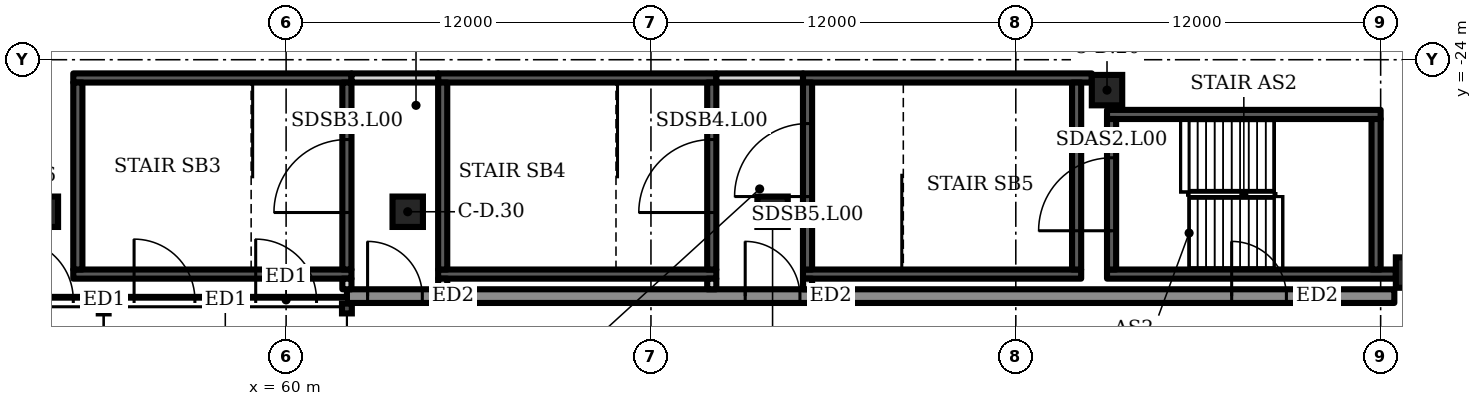
"""IFC4 building model, lengths in metres.
Left out: names, types, materials, properties, quantities, classifications, styles, units other than length and angle.
Written with IfcOpenShell. Run it as: python <this file> out.ifc"""

import sys

from ifc_helpers import new_model, si_unit, direction, frame, frame_2d, origin, origin_2d, place, context, subcontext, project, spatial, rectangle, hollow_circle, extrude, element, fill, save


model = new_model("IFC4")
c1 = context("Model", 3, precision=1e-05, world=origin(), true_north=direction((0.0, 1.0)))
c2 = subcontext(c1, "Body", "Model", "MODEL_VIEW")
j1 = project(units=[si_unit("LENGTHUNIT", "METRE"), si_unit("PLANEANGLEUNIT", "RADIAN")], contexts=[c1])
p1 = place(None, origin())
s1 = spatial("IfcSite", under=j1, at=p1, CompositionType="ELEMENT")
p2 = place(p1, origin())
s2 = spatial("IfcBuilding", under=s1, at=p2, CompositionType="ELEMENT")
p3 = place(p2, origin())
s3 = spatial("IfcBuildingStorey", under=s2, at=p3, CompositionType="ELEMENT", Elevation=0.0)
for number, where, z_axis, x_axis in (
    (1, (97.0, -31.0, 0.0), (0.0, 0.0, 1.0), (1.0, 0.0, 0.0)),
    (2, (87.0, -25.0, 0.0), (0.0, 0.0, 1.0), (1.0, 0.0, 0.0)),
    (3, (52.0, -29.0, 0.0), (0.0, 0.0, 1.0), (1.0, 0.0, 0.0)),
    (4, (64.0, -29.0, 0.0), (0.0, 0.0, 1.0), (1.0, 0.0, 0.0)),
    (5, (76.0, -29.0, 0.0), (0.0, 0.0, 1.0), (1.0, 0.0, 0.0)),
):
    element("IfcColumn", number, at=place(p3, frame(where, z_axis=z_axis, x_axis=x_axis)), inside=s3, PredefinedType="COLUMN", context=c2, shape_type="SweptSolid", body=[
        extrude(rectangle(XDim=1.0, YDim=1.0, at=origin_2d()), origin(), (0.0, 0.0, 1.0), 8.0),
    ])
p4 = place(p3, frame((62.0, -31.775, 0.0), z_axis=(0.0, 0.0, 1.0), x_axis=(1.0, 0.0, 0.0)))
e6 = element("IfcWall", 6, at=p4, inside=s3, PredefinedType="SOLIDWALL", context=c2, shape_type="SweptSolid", body=[
    extrude(rectangle(XDim=34.45, YDim=0.45, at=frame_2d((17.225, 0.0))), origin(), (0.0, 0.0, 1.0), 7.7),
])
p5 = place(p4, frame((13.1, 0.0, 0.0)))
e7 = element("IfcOpeningElement", 7, at=p5, cuts=e6, PredefinedType="OPENING", context=c2, shape_type="SweptSolid", body=[
    extrude(rectangle(XDim=1.8, YDim=2.4, at=frame_2d((0.9, 1.2))), frame((0.0, 0.235, 0.0), z_axis=(0.0, -1.0, 0.0), x_axis=(1.0, 0.0, 0.0)), (0.0, 0.0, 1.0), 0.47),
])
p6 = place(p4, frame((29.1, 0.0, 0.0)))
e8 = element("IfcOpeningElement", 8, at=p6, cuts=e6, PredefinedType="OPENING", context=c2, shape_type="SweptSolid", body=[
    extrude(rectangle(XDim=1.8, YDim=2.4, at=frame_2d((0.9, 1.2))), frame((0.0, 0.235, 0.0), z_axis=(0.0, -1.0, 0.0), x_axis=(1.0, 0.0, 0.0)), (0.0, 0.0, 1.0), 0.47),
])
p7 = place(p4, frame((0.68, 0.0, 0.0)))
e9 = element("IfcOpeningElement", 9, at=p7, cuts=e6, PredefinedType="OPENING", context=c2, shape_type="SweptSolid", body=[
    extrude(rectangle(XDim=1.8, YDim=2.4, at=frame_2d((0.9, 1.2))), frame((0.0, 0.235, 0.0), z_axis=(0.0, -1.0, 0.0), x_axis=(1.0, 0.0, 0.0)), (0.0, 0.0, 1.0), 0.47),
])
p8 = place(p3, frame((46.0, -31.9, 0.0), z_axis=(0.0, 0.0, 1.0), x_axis=(1.0, 0.0, 0.0)))
e10 = element("IfcWall", 10, at=p8, inside=s3, PredefinedType="SOLIDWALL", context=c2, shape_type="SweptSolid", body=[
    extrude(rectangle(XDim=8.0, YDim=0.2, at=frame_2d((4.0, 0.0))), origin(), (0.0, 0.0, 1.0), 2.6),
])
p9 = place(p8, frame((1.0, 0.0, 0.0)))
e11 = element("IfcOpeningElement", 11, at=p9, cuts=e10, PredefinedType="OPENING", context=c2, shape_type="SweptSolid", body=[
    extrude(rectangle(XDim=2.0, YDim=2.4, at=frame_2d((1.0, 1.2))), frame((0.0, 0.11, 0.0), z_axis=(0.0, -1.0, 0.0), x_axis=(1.0, 0.0, 0.0)), (0.0, 0.0, 1.0), 0.22),
])
p10 = place(p8, frame((5.0, 0.0, 0.0)))
e12 = element("IfcOpeningElement", 12, at=p10, cuts=e10, PredefinedType="OPENING", context=c2, shape_type="SweptSolid", body=[
    extrude(rectangle(XDim=2.0, YDim=2.4, at=frame_2d((1.0, 1.2))), frame((0.0, 0.11, 0.0), z_axis=(0.0, -1.0, 0.0), x_axis=(1.0, 0.0, 0.0)), (0.0, 0.0, 1.0), 0.22),
])
p11 = place(p3, frame((54.0, -31.9, 0.0), z_axis=(0.0, 0.0, 1.0), x_axis=(1.0, 0.0, 0.0)))
e13 = element("IfcWall", 13, at=p11, inside=s3, PredefinedType="SOLIDWALL", context=c2, shape_type="SweptSolid", body=[
    extrude(rectangle(XDim=8.0, YDim=0.2, at=frame_2d((4.0, 0.0))), origin(), (0.0, 0.0, 1.0), 2.6),
])
p12 = place(p11, frame((1.0, 0.0, 0.0)))
e14 = element("IfcOpeningElement", 14, at=p12, cuts=e13, PredefinedType="OPENING", context=c2, shape_type="SweptSolid", body=[
    extrude(rectangle(XDim=2.0, YDim=2.4, at=frame_2d((1.0, 1.2))), frame((0.0, 0.11, 0.0), z_axis=(0.0, -1.0, 0.0), x_axis=(1.0, 0.0, 0.0)), (0.0, 0.0, 1.0), 0.22),
])
p13 = place(p11, frame((5.0, 0.0, 0.0)))
e15 = element("IfcOpeningElement", 15, at=p13, cuts=e13, PredefinedType="OPENING", context=c2, shape_type="SweptSolid", body=[
    extrude(rectangle(XDim=2.0, YDim=2.4, at=frame_2d((1.0, 1.2))), frame((0.0, 0.11, 0.0), z_axis=(0.0, -1.0, 0.0), x_axis=(1.0, 0.0, 0.0)), (0.0, 0.0, 1.0), 0.22),
])
p14 = place(p3, frame((87.0, -31.05, 0.0), z_axis=(0.0, 0.0, 1.0), x_axis=(1.0, 0.0, 0.0)))
e16 = element("IfcWall", 16, at=p14, inside=s3, PredefinedType="SHEAR", context=c2, shape_type="SweptSolid", body=[
    extrude(rectangle(XDim=9.5, YDim=0.3, at=frame_2d((4.75, 0.0))), origin(), (0.0, 0.0, 1.0), 7.7),
])
p15 = place(p3, frame((87.0, -25.8, 0.0), z_axis=(0.0, 0.0, 1.0), x_axis=(1.0, 0.0, 0.0)))
e17 = element("IfcWall", 17, at=p15, inside=s3, PredefinedType="SHEAR", context=c2, shape_type="SweptSolid", body=[
    extrude(rectangle(XDim=9.0, YDim=0.3, at=frame_2d((4.5, 0.0))), origin(), (0.0, 0.0, 1.0), 7.7),
])
p16 = place(p3, frame((87.15, -30.9, 0.0), z_axis=(0.0, 0.0, 1.0), x_axis=(0.0, 1.0, 0.0)))
e18 = element("IfcWall", 18, at=p16, inside=s3, PredefinedType="SHEAR", context=c2, shape_type="SweptSolid", body=[
    extrude(rectangle(XDim=4.95, YDim=0.3, at=frame_2d((2.475, 0.0))), origin(), (0.0, 0.0, 1.0), 7.7),
])
p17 = place(p16, frame((1.275, 0.0, 0.0)))
e19 = element("IfcOpeningElement", 19, at=p17, cuts=e18, PredefinedType="OPENING", context=c2, shape_type="SweptSolid", body=[
    extrude(rectangle(XDim=2.4, YDim=2.1, at=frame_2d((1.2, 1.05))), frame((0.0, 0.16, 0.0), z_axis=(0.0, -1.0, 0.0), x_axis=(1.0, 0.0, 0.0)), (0.0, 0.0, 1.0), 0.32),
])
p18 = place(p3, frame((95.85, -30.9, 0.0), z_axis=(0.0, 0.0, 1.0), x_axis=(0.0, 1.0, 0.0)))
e20 = element("IfcWall", 20, at=p18, inside=s3, PredefinedType="SHEAR", context=c2, shape_type="SweptSolid", body=[
    extrude(rectangle(XDim=4.95, YDim=0.3, at=frame_2d((2.475, 0.0))), origin(), (0.0, 0.0, 1.0), 7.7),
])
for number, where, z_axis, x_axis in (
    (21, (53.0, -31.05, 0.0), (0.0, 0.0, 1.0), (1.0, 0.0, 0.0)),
    (22, (53.0, -24.6, 0.0), (0.0, 0.0, 1.0), (1.0, 0.0, 0.0)),
):
    element("IfcWall", number, at=place(p3, frame(where, z_axis=z_axis, x_axis=x_axis)), inside=s3, PredefinedType="SHEAR", context=c2, shape_type="SweptSolid", body=[
        extrude(rectangle(XDim=9.15, YDim=0.3, at=frame_2d((4.575, 0.0))), origin(), (0.0, 0.0, 1.0), 7.7),
    ])
p19 = place(p3, frame((53.15, -30.9, 0.0), z_axis=(0.0, 0.0, 1.0), x_axis=(0.0, 1.0, 0.0)))
e23 = element("IfcWall", 23, at=p19, inside=s3, PredefinedType="SHEAR", context=c2, shape_type="SweptSolid", body=[
    extrude(rectangle(XDim=6.15, YDim=0.3, at=frame_2d((3.075, 0.0))), origin(), (0.0, 0.0, 1.0), 7.7),
])
p20 = place(p3, frame((62.0, -30.9, 0.0), z_axis=(0.0, 0.0, 1.0), x_axis=(0.0, 1.0, 0.0)))
e24 = element("IfcWall", 24, at=p20, inside=s3, PredefinedType="SHEAR", context=c2, shape_type="SweptSolid", body=[
    extrude(rectangle(XDim=6.15, YDim=0.3, at=frame_2d((3.075, 0.0))), origin(), (0.0, 0.0, 1.0), 7.7),
])
p21 = place(p20, frame((1.875, 0.0, 0.0)))
e25 = element("IfcOpeningElement", 25, at=p21, cuts=e24, PredefinedType="OPENING", context=c2, shape_type="SweptSolid", body=[
    extrude(rectangle(XDim=2.4, YDim=2.1, at=frame_2d((1.2, 1.05))), frame((0.0, 0.16, 0.0), z_axis=(0.0, -1.0, 0.0), x_axis=(1.0, 0.0, 0.0)), (0.0, 0.0, 1.0), 0.32),
])
for number, where, z_axis, x_axis in (
    (26, (65.0, -31.05, 0.0), (0.0, 0.0, 1.0), (1.0, 0.0, 0.0)),
    (27, (65.0, -24.6, 0.0), (0.0, 0.0, 1.0), (1.0, 0.0, 0.0)),
):
    element("IfcWall", number, at=place(p3, frame(where, z_axis=z_axis, x_axis=x_axis)), inside=s3, PredefinedType="SHEAR", context=c2, shape_type="SweptSolid", body=[
        extrude(rectangle(XDim=9.15, YDim=0.3, at=frame_2d((4.575, 0.0))), origin(), (0.0, 0.0, 1.0), 7.7),
    ])
p22 = place(p3, frame((65.15, -30.9, 0.0), z_axis=(0.0, 0.0, 1.0), x_axis=(0.0, 1.0, 0.0)))
e28 = element("IfcWall", 28, at=p22, inside=s3, PredefinedType="SHEAR", context=c2, shape_type="SweptSolid", body=[
    extrude(rectangle(XDim=6.15, YDim=0.3, at=frame_2d((3.075, 0.0))), origin(), (0.0, 0.0, 1.0), 7.7),
])
p23 = place(p3, frame((74.0, -30.9, 0.0), z_axis=(0.0, 0.0, 1.0), x_axis=(0.0, 1.0, 0.0)))
e29 = element("IfcWall", 29, at=p23, inside=s3, PredefinedType="SHEAR", context=c2, shape_type="SweptSolid", body=[
    extrude(rectangle(XDim=6.15, YDim=0.3, at=frame_2d((3.075, 0.0))), origin(), (0.0, 0.0, 1.0), 7.7),
])
p24 = place(p23, frame((1.875, 0.0, 0.0)))
e30 = element("IfcOpeningElement", 30, at=p24, cuts=e29, PredefinedType="OPENING", context=c2, shape_type="SweptSolid", body=[
    extrude(rectangle(XDim=2.4, YDim=2.1, at=frame_2d((1.2, 1.05))), frame((0.0, 0.16, 0.0), z_axis=(0.0, -1.0, 0.0), x_axis=(1.0, 0.0, 0.0)), (0.0, 0.0, 1.0), 0.32),
])
p25 = place(p3, frame((77.0, -31.05, 0.0), z_axis=(0.0, 0.0, 1.0), x_axis=(1.0, 0.0, 0.0)))
e31 = element("IfcWall", 31, at=p25, inside=s3, PredefinedType="SHEAR", context=c2, shape_type="SweptSolid", body=[
    extrude(rectangle(XDim=9.15, YDim=0.3, at=frame_2d((4.575, 0.0))), origin(), (0.0, 0.0, 1.0), 7.7),
])
p26 = place(p3, frame((77.0, -24.6, 0.0), z_axis=(0.0, 0.0, 1.0), x_axis=(1.0, 0.0, 0.0)))
e32 = element("IfcWall", 32, at=p26, inside=s3, PredefinedType="SHEAR", context=c2, shape_type="SweptSolid", body=[
    extrude(rectangle(XDim=9.5, YDim=0.3, at=frame_2d((4.75, 0.0))), origin(), (0.0, 0.0, 1.0), 7.7),
])
p27 = place(p3, frame((77.15, -30.9, 0.0), z_axis=(0.0, 0.0, 1.0), x_axis=(0.0, 1.0, 0.0)))
e33 = element("IfcWall", 33, at=p27, inside=s3, PredefinedType="SHEAR", context=c2, shape_type="SweptSolid", body=[
    extrude(rectangle(XDim=6.15, YDim=0.3, at=frame_2d((3.075, 0.0))), origin(), (0.0, 0.0, 1.0), 7.7),
])
p28 = place(p27, frame((2.4, 0.0, 0.0)))
e34 = element("IfcOpeningElement", 34, at=p28, cuts=e33, PredefinedType="OPENING", context=c2, shape_type="SweptSolid", body=[
    extrude(rectangle(XDim=2.4, YDim=2.1, at=frame_2d((1.2, 1.05))), frame((0.0, 0.16, 0.0), z_axis=(0.0, -1.0, 0.0), x_axis=(1.0, 0.0, 0.0)), (0.0, 0.0, 1.0), 0.32),
])
p29 = place(p3, frame((86.0, -30.9, 0.0), z_axis=(0.0, 0.0, 1.0), x_axis=(0.0, 1.0, 0.0)))
e35 = element("IfcWall", 35, at=p29, inside=s3, PredefinedType="SHEAR", context=c2, shape_type="SweptSolid", body=[
    extrude(rectangle(XDim=6.15, YDim=0.3, at=frame_2d((3.075, 0.0))), origin(), (0.0, 0.0, 1.0), 7.7),
])
p30 = place(p3, frame((62.15, -24.6, 0.0), z_axis=(0.0, 0.0, 1.0), x_axis=(1.0, 0.0, 0.0)))
e36 = element("IfcWall", 36, at=p30, inside=s3, PredefinedType="PARTITIONING", context=c2, shape_type="SweptSolid", body=[
    extrude(rectangle(XDim=2.85, YDim=0.3, at=frame_2d((1.425, 0.0))), origin(), (0.0, 0.0, 1.0), 7.7),
])
for number, where, z_axis, x_axis in (
    (37, (62.0, -31.55, 0.0), (0.0, 0.0, 1.0), (0.0, 1.0, 0.0)),
    (38, (65.15, -31.55, 0.0), (0.0, 0.0, 1.0), (0.0, 1.0, 0.0)),
):
    element("IfcWall", number, at=place(p3, frame(where, z_axis=z_axis, x_axis=x_axis)), inside=s3, PredefinedType="PARTITIONING", context=c2, shape_type="SweptSolid", body=[
        extrude(rectangle(XDim=0.35, YDim=0.3, at=frame_2d((0.175, 0.0))), origin(), (0.0, 0.0, 1.0), 7.7),
    ])
p31 = place(p3, frame((74.15, -24.6, 0.0), z_axis=(0.0, 0.0, 1.0), x_axis=(1.0, 0.0, 0.0)))
e39 = element("IfcWall", 39, at=p31, inside=s3, PredefinedType="PARTITIONING", context=c2, shape_type="SweptSolid", body=[
    extrude(rectangle(XDim=2.85, YDim=0.3, at=frame_2d((1.425, 0.0))), origin(), (0.0, 0.0, 1.0), 7.7),
])
for number, where, z_axis, x_axis in (
    (40, (74.0, -31.55, 0.0), (0.0, 0.0, 1.0), (0.0, 1.0, 0.0)),
    (41, (77.15, -31.55, 0.0), (0.0, 0.0, 1.0), (0.0, 1.0, 0.0)),
):
    element("IfcWall", number, at=place(p3, frame(where, z_axis=z_axis, x_axis=x_axis)), inside=s3, PredefinedType="PARTITIONING", context=c2, shape_type="SweptSolid", body=[
        extrude(rectangle(XDim=0.35, YDim=0.3, at=frame_2d((0.175, 0.0))), origin(), (0.0, 0.0, 1.0), 7.7),
    ])
for number, where, z_axis, x_axis in (
    (42, (54.0, -32.182, 0.0), (0.0, 0.0, 1.0), (1.0, 0.0, 0.0)),
    (43, (62.0, -32.182, 0.0), (0.0, 0.0, 1.0), (1.0, 0.0, 0.0)),
):
    element("IfcColumn", number, at=place(p3, frame(where, z_axis=z_axis, x_axis=x_axis)), inside=s3, PredefinedType="COLUMN", context=c2, shape_type="SweptSolid", body=[
        extrude(hollow_circle(Radius=0.162, WallThickness=0.01, at=origin_2d()), origin(), (0.0, 0.0, 1.0), 3.2),
    ])
p32 = place(p5, origin())
e44 = element("IfcDoor", 44, at=p32, inside=s3, OperationType="DOUBLE_DOOR_DOUBLE_SWING", PredefinedType="DOOR", context=c2, shape_type="SweptSolid", body=[
    extrude(rectangle(XDim=1.8, YDim=2.4, at=frame_2d((0.9, 1.2))), frame((0.0, 0.025, 0.0), z_axis=(0.0, -1.0, 0.0), x_axis=(1.0, 0.0, 0.0)), (0.0, 0.0, 1.0), 0.05),
])
fill(e7, e44)
p33 = place(p6, origin())
e45 = element("IfcDoor", 45, at=p33, inside=s3, OperationType="DOUBLE_DOOR_DOUBLE_SWING", PredefinedType="DOOR", context=c2, shape_type="SweptSolid", body=[
    extrude(rectangle(XDim=1.8, YDim=2.4, at=frame_2d((0.9, 1.2))), frame((0.0, 0.025, 0.0), z_axis=(0.0, -1.0, 0.0), x_axis=(1.0, 0.0, 0.0)), (0.0, 0.0, 1.0), 0.05),
])
fill(e8, e45)
p34 = place(p7, origin())
e46 = element("IfcDoor", 46, at=p34, inside=s3, OperationType="DOUBLE_DOOR_DOUBLE_SWING", PredefinedType="DOOR", context=c2, shape_type="SweptSolid", body=[
    extrude(rectangle(XDim=1.8, YDim=2.4, at=frame_2d((0.9, 1.2))), frame((0.0, 0.025, 0.0), z_axis=(0.0, -1.0, 0.0), x_axis=(1.0, 0.0, 0.0)), (0.0, 0.0, 1.0), 0.05),
])
fill(e9, e46)
p35 = place(p10, origin())
e47 = element("IfcDoor", 47, at=p35, inside=s3, OperationType="DOUBLE_DOOR_DOUBLE_SWING", PredefinedType="DOOR", context=c2, shape_type="SweptSolid", body=[
    extrude(rectangle(XDim=2.0, YDim=2.4, at=frame_2d((1.0, 1.2))), frame((0.0, 0.025, 0.0), z_axis=(0.0, -1.0, 0.0), x_axis=(1.0, 0.0, 0.0)), (0.0, 0.0, 1.0), 0.05),
])
fill(e12, e47)
p36 = place(p12, origin())
e48 = element("IfcDoor", 48, at=p36, inside=s3, OperationType="DOUBLE_DOOR_DOUBLE_SWING", PredefinedType="DOOR", context=c2, shape_type="SweptSolid", body=[
    extrude(rectangle(XDim=2.0, YDim=2.4, at=frame_2d((1.0, 1.2))), frame((0.0, 0.025, 0.0), z_axis=(0.0, -1.0, 0.0), x_axis=(1.0, 0.0, 0.0)), (0.0, 0.0, 1.0), 0.05),
])
fill(e14, e48)
p37 = place(p13, origin())
e49 = element("IfcDoor", 49, at=p37, inside=s3, OperationType="DOUBLE_DOOR_DOUBLE_SWING", PredefinedType="DOOR", context=c2, shape_type="SweptSolid", body=[
    extrude(rectangle(XDim=2.0, YDim=2.4, at=frame_2d((1.0, 1.2))), frame((0.0, 0.025, 0.0), z_axis=(0.0, -1.0, 0.0), x_axis=(1.0, 0.0, 0.0)), (0.0, 0.0, 1.0), 0.05),
])
fill(e15, e49)
p38 = place(p17, origin())
e50 = element("IfcDoor", 50, at=p38, inside=s3, OperationType="DOUBLE_DOOR_SINGLE_SWING", PredefinedType="DOOR", context=c2, shape_type="SweptSolid", body=[
    extrude(rectangle(XDim=2.4, YDim=2.1, at=frame_2d((1.2, 1.05))), frame((0.0, 0.025, 0.0), z_axis=(0.0, -1.0, 0.0), x_axis=(1.0, 0.0, 0.0)), (0.0, 0.0, 1.0), 0.05),
])
fill(e19, e50)
p39 = place(p21, origin())
e51 = element("IfcDoor", 51, at=p39, inside=s3, OperationType="DOUBLE_DOOR_SINGLE_SWING", PredefinedType="DOOR", context=c2, shape_type="SweptSolid", body=[
    extrude(rectangle(XDim=2.4, YDim=2.1, at=frame_2d((1.2, 1.05))), frame((0.0, 0.025, 0.0), z_axis=(0.0, -1.0, 0.0), x_axis=(1.0, 0.0, 0.0)), (0.0, 0.0, 1.0), 0.05),
])
fill(e25, e51)
p40 = place(p24, origin())
e52 = element("IfcDoor", 52, at=p40, inside=s3, OperationType="DOUBLE_DOOR_SINGLE_SWING", PredefinedType="DOOR", context=c2, shape_type="SweptSolid", body=[
    extrude(rectangle(XDim=2.4, YDim=2.1, at=frame_2d((1.2, 1.05))), frame((0.0, 0.025, 0.0), z_axis=(0.0, -1.0, 0.0), x_axis=(1.0, 0.0, 0.0)), (0.0, 0.0, 1.0), 0.05),
])
fill(e30, e52)
p41 = place(p28, origin())
e53 = element("IfcDoor", 53, at=p41, inside=s3, OperationType="DOUBLE_DOOR_SINGLE_SWING", PredefinedType="DOOR", context=c2, shape_type="SweptSolid", body=[
    extrude(rectangle(XDim=2.4, YDim=2.1, at=frame_2d((1.2, 1.05))), frame((0.0, 0.025, 0.0), z_axis=(0.0, -1.0, 0.0), x_axis=(1.0, 0.0, 0.0)), (0.0, 0.0, 1.0), 0.05),
])
fill(e34, e53)
save(model, sys.argv[1])
